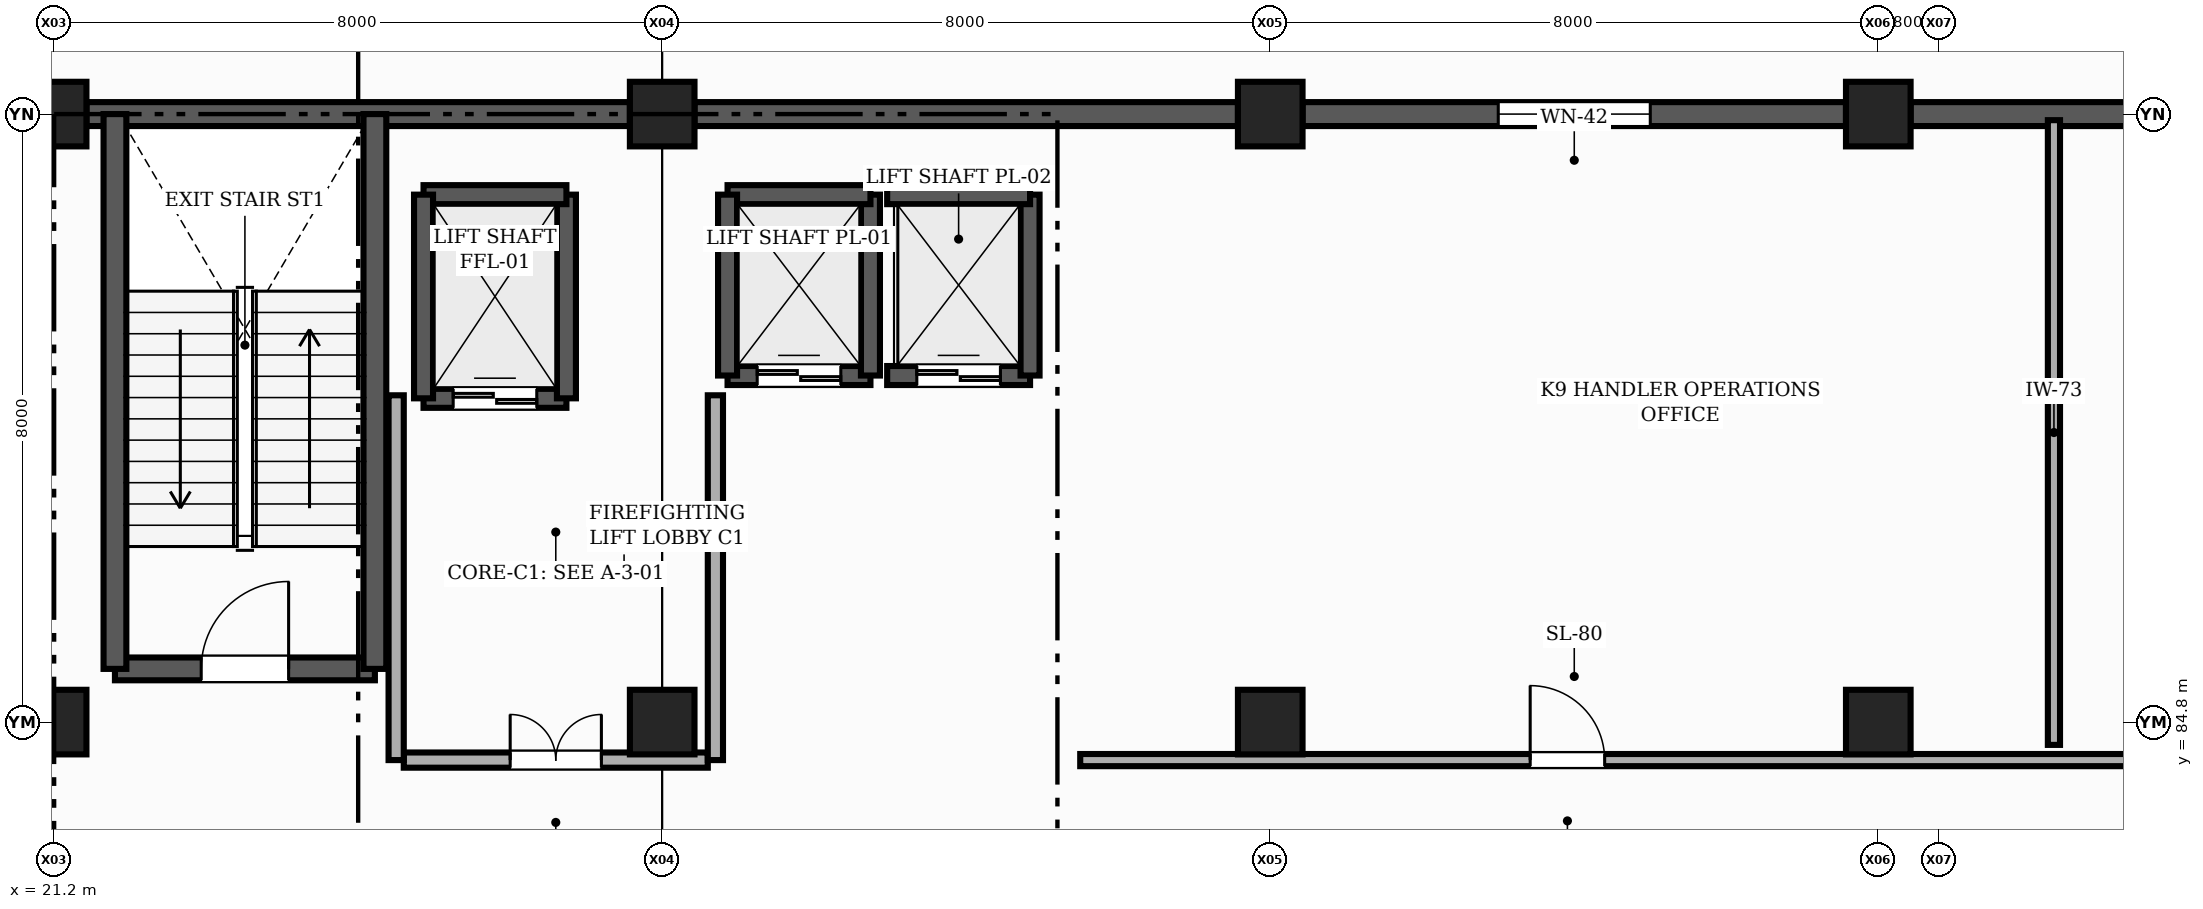
"""IFC4 building model, lengths in metres.
Left out: names, types, materials, properties, quantities, classifications, styles, units other than length and angle.
Written with IfcOpenShell. Run it as: python <this file> out.ifc"""

import sys

from ifc_helpers import new_model, si_unit, direction, frame, frame_2d, origin, origin_2d, place, context, subcontext, project, spatial, rectangle, extrude, element, fill, save


model = new_model("IFC4")
c1 = context("Model", 3, precision=1e-05, world=origin(), true_north=direction((0.0, 1.0)))
c2 = subcontext(c1, "Body", "Model", "MODEL_VIEW")
j1 = project(units=[si_unit("LENGTHUNIT", "METRE"), si_unit("PLANEANGLEUNIT", "RADIAN")], contexts=[c1])
p1 = place(None, origin())
s1 = spatial("IfcSite", under=j1, at=p1, CompositionType="ELEMENT")
p2 = place(p1, origin())
s2 = spatial("IfcBuilding", under=s1, at=p2, CompositionType="ELEMENT")
p3 = place(p2, origin())
s3 = spatial("IfcBuildingStorey", under=s2, at=p3, CompositionType="ELEMENT", Elevation=0.0)
for number, where, z_axis, x_axis in (
    (1, (21.2, 84.8, 0.0), (0.0, 0.0, 1.0), (1.0, 0.0, 0.0)),
    (2, (21.2, 92.8, 0.0), (0.0, 0.0, 1.0), (1.0, 0.0, 0.0)),
    (3, (29.2, 84.8, 0.0), (0.0, 0.0, 1.0), (1.0, 0.0, 0.0)),
    (4, (29.2, 92.8, 0.0), (0.0, 0.0, 1.0), (1.0, 0.0, 0.0)),
    (5, (37.2, 84.8, 0.0), (0.0, 0.0, 1.0), (1.0, 0.0, 0.0)),
    (6, (37.2, 92.8, 0.0), (0.0, 0.0, 1.0), (1.0, 0.0, 0.0)),
    (7, (45.2, 84.8, 0.0), (0.0, 0.0, 1.0), (1.0, 0.0, 0.0)),
    (8, (45.2, 92.8, 0.0), (0.0, 0.0, 1.0), (1.0, 0.0, 0.0)),
):
    element("IfcColumn", number, at=place(p3, frame(where, z_axis=z_axis, x_axis=x_axis)), inside=s3, PredefinedType="COLUMN", context=c2, shape_type="SweptSolid", body=[
        extrude(rectangle(XDim=0.85, YDim=0.85, at=origin_2d()), origin(), (0.0, 0.0, 1.0), 4.8),
    ])
p4 = place(p3, frame((53.575, 92.8, 0.0), z_axis=(0.0, 0.0, 1.0), x_axis=(-1.0, 0.0, 0.0)))
e9 = element("IfcWall", 9, at=p4, inside=s3, PredefinedType="SOLIDWALL", context=c2, shape_type="SweptSolid", body=[
    extrude(rectangle(XDim=7.95, YDim=0.315, at=frame_2d((3.975, 0.0))), origin(), (0.0, 0.0, 1.0), 3.78),
])
p5 = place(p4, frame((3.075, 0.0, 0.9)))
e10 = element("IfcOpeningElement", 10, at=p5, cuts=e9, PredefinedType="OPENING", context=c2, shape_type="SweptSolid", body=[
    extrude(rectangle(XDim=1.8, YDim=1.4, at=frame_2d((0.9, 0.7))), frame((0.0, 0.167, 0.0), z_axis=(0.0, -1.0, 0.0), x_axis=(1.0, 0.0, 0.0)), (0.0, 0.0, 1.0), 0.335),
])
p6 = place(p3, frame((44.775, 92.8, 0.0), z_axis=(0.0, 0.0, 1.0), x_axis=(-1.0, 0.0, 0.0)))
e11 = element("IfcWall", 11, at=p6, inside=s3, PredefinedType="SOLIDWALL", context=c2, shape_type="SweptSolid", body=[
    extrude(rectangle(XDim=7.15, YDim=0.315, at=frame_2d((3.575, 0.0))), origin(), (0.0, 0.0, 1.0), 3.78),
])
p7 = place(p6, frame((2.575, 0.0, 0.9)))
e12 = element("IfcOpeningElement", 12, at=p7, cuts=e11, PredefinedType="OPENING", context=c2, shape_type="SweptSolid", body=[
    extrude(rectangle(XDim=2.0, YDim=1.5, at=frame_2d((1.0, 0.75))), frame((0.0, 0.167, 0.0), z_axis=(0.0, -1.0, 0.0), x_axis=(1.0, 0.0, 0.0)), (0.0, 0.0, 1.0), 0.335),
])
p8 = place(p3, frame((36.775, 92.8, -0.42), z_axis=(0.0, 0.0, 1.0), x_axis=(-1.0, 0.0, 0.0)))
e13 = element("IfcWall", 13, at=p8, inside=s3, PredefinedType="SOLIDWALL", context=c2, shape_type="SweptSolid", body=[
    extrude(rectangle(XDim=7.15, YDim=0.315, at=frame_2d((3.575, 0.0))), origin(), (0.0, 0.0, 1.0), 4.2),
])
p9 = place(p3, frame((28.775, 92.8, -0.42), z_axis=(0.0, 0.0, 1.0), x_axis=(-1.0, 0.0, 0.0)))
e14 = element("IfcWall", 14, at=p9, inside=s3, PredefinedType="SOLIDWALL", context=c2, shape_type="SweptSolid", body=[
    extrude(rectangle(XDim=7.15, YDim=0.315, at=frame_2d((3.575, 0.0))), origin(), (0.0, 0.0, 1.0), 4.95),
])
p10 = place(p3, frame((22.0, 85.5, 0.0), z_axis=(0.0, 0.0, 1.0), x_axis=(1.0, 0.0, 0.0)))
e15 = element("IfcWall", 15, at=p10, inside=s3, PredefinedType="SHEAR", context=c2, shape_type="SweptSolid", body=[
    extrude(rectangle(XDim=3.42, YDim=0.3, at=frame_2d((1.71, 0.0))), origin(), (0.0, 0.0, 1.0), 4.8),
])
p11 = place(p10, frame((1.135, 0.0, 0.0)))
e16 = element("IfcOpeningElement", 16, at=p11, cuts=e15, PredefinedType="OPENING", context=c2, shape_type="SweptSolid", body=[
    extrude(rectangle(XDim=1.15, YDim=2.15, at=frame_2d((0.575, 1.075))), frame((0.0, 0.16, 0.0), z_axis=(0.0, -1.0, 0.0), x_axis=(1.0, 0.0, 0.0)), (0.0, 0.0, 1.0), 0.32),
])
for number, where, z_axis, x_axis in (
    (17, (25.42, 85.5, 0.0), (0.0, 0.0, 1.0), (0.0, 1.0, 0.0)),
    (18, (22.0, 92.8, 0.0), (0.0, 0.0, 1.0), (0.0, -1.0, 0.0)),
):
    element("IfcWall", number, at=place(p3, frame(where, z_axis=z_axis, x_axis=x_axis)), inside=s3, PredefinedType="SHEAR", context=c2, shape_type="SweptSolid", body=[
        extrude(rectangle(XDim=7.3, YDim=0.3, at=frame_2d((3.65, 0.0))), origin(), (0.0, 0.0, 1.0), 4.8),
    ])
p12 = place(p3, frame((26.06, 89.06, 0.0), z_axis=(0.0, 0.0, 1.0), x_axis=(1.0, 0.0, 0.0)))
e19 = element("IfcWall", 19, at=p12, inside=s3, PredefinedType="SHEAR", context=c2, shape_type="SweptSolid", body=[
    extrude(rectangle(XDim=1.88, YDim=0.25, at=frame_2d((0.94, 0.0))), origin(), (0.0, 0.0, 1.0), 4.8),
])
p13 = place(p12, frame((0.39, 0.0, 0.0)))
e20 = element("IfcOpeningElement", 20, at=p13, cuts=e19, PredefinedType="OPENING", context=c2, shape_type="SweptSolid", body=[
    extrude(rectangle(XDim=1.1, YDim=2.2, at=frame_2d((0.55, 1.1))), frame((0.0, 0.135, 0.0), z_axis=(0.0, -1.0, 0.0), x_axis=(1.0, 0.0, 0.0)), (0.0, 0.0, 1.0), 0.27),
])
p14 = place(p3, frame((27.94, 89.06, 0.0), z_axis=(0.0, 0.0, 1.0), x_axis=(0.0, 1.0, 0.0)))
e21 = element("IfcWall", 21, at=p14, inside=s3, PredefinedType="SHEAR", context=c2, shape_type="SweptSolid", body=[
    extrude(rectangle(XDim=2.68, YDim=0.25, at=frame_2d((1.34, 0.0))), origin(), (0.0, 0.0, 1.0), 4.8),
])
p15 = place(p3, frame((27.94, 91.74, 0.0), z_axis=(0.0, 0.0, 1.0), x_axis=(-1.0, 0.0, 0.0)))
e22 = element("IfcWall", 22, at=p15, inside=s3, PredefinedType="SHEAR", context=c2, shape_type="SweptSolid", body=[
    extrude(rectangle(XDim=1.88, YDim=0.25, at=frame_2d((0.94, 0.0))), origin(), (0.0, 0.0, 1.0), 4.8),
])
p16 = place(p3, frame((26.06, 91.74, 0.0), z_axis=(0.0, 0.0, 1.0), x_axis=(0.0, -1.0, 0.0)))
e23 = element("IfcWall", 23, at=p16, inside=s3, PredefinedType="SHEAR", context=c2, shape_type="SweptSolid", body=[
    extrude(rectangle(XDim=2.68, YDim=0.25, at=frame_2d((1.34, 0.0))), origin(), (0.0, 0.0, 1.0), 4.8),
])
p17 = place(p3, frame((30.06, 89.36, 0.0), z_axis=(0.0, 0.0, 1.0), x_axis=(1.0, 0.0, 0.0)))
e24 = element("IfcWall", 24, at=p17, inside=s3, PredefinedType="SHEAR", context=c2, shape_type="SweptSolid", body=[
    extrude(rectangle(XDim=1.88, YDim=0.25, at=frame_2d((0.94, 0.0))), origin(), (0.0, 0.0, 1.0), 4.8),
])
p18 = place(p17, frame((0.39, 0.0, 0.0)))
e25 = element("IfcOpeningElement", 25, at=p18, cuts=e24, PredefinedType="OPENING", context=c2, shape_type="SweptSolid", body=[
    extrude(rectangle(XDim=1.1, YDim=2.2, at=frame_2d((0.55, 1.1))), frame((0.0, 0.135, 0.0), z_axis=(0.0, -1.0, 0.0), x_axis=(1.0, 0.0, 0.0)), (0.0, 0.0, 1.0), 0.27),
])
p19 = place(p3, frame((31.94, 89.36, 0.0), z_axis=(0.0, 0.0, 1.0), x_axis=(0.0, 1.0, 0.0)))
e26 = element("IfcWall", 26, at=p19, inside=s3, PredefinedType="SHEAR", context=c2, shape_type="SweptSolid", body=[
    extrude(rectangle(XDim=2.38, YDim=0.25, at=frame_2d((1.19, 0.0))), origin(), (0.0, 0.0, 1.0), 4.8),
])
p20 = place(p3, frame((31.94, 91.74, 0.0), z_axis=(0.0, 0.0, 1.0), x_axis=(-1.0, 0.0, 0.0)))
e27 = element("IfcWall", 27, at=p20, inside=s3, PredefinedType="SHEAR", context=c2, shape_type="SweptSolid", body=[
    extrude(rectangle(XDim=1.88, YDim=0.25, at=frame_2d((0.94, 0.0))), origin(), (0.0, 0.0, 1.0), 4.8),
])
p21 = place(p3, frame((30.06, 91.74, 0.0), z_axis=(0.0, 0.0, 1.0), x_axis=(0.0, -1.0, 0.0)))
e28 = element("IfcWall", 28, at=p21, inside=s3, PredefinedType="SHEAR", context=c2, shape_type="SweptSolid", body=[
    extrude(rectangle(XDim=2.38, YDim=0.25, at=frame_2d((1.19, 0.0))), origin(), (0.0, 0.0, 1.0), 4.8),
])
p22 = place(p3, frame((32.16, 89.36, 0.0), z_axis=(0.0, 0.0, 1.0), x_axis=(1.0, 0.0, 0.0)))
e29 = element("IfcWall", 29, at=p22, inside=s3, PredefinedType="SHEAR", context=c2, shape_type="SweptSolid", body=[
    extrude(rectangle(XDim=1.88, YDim=0.25, at=frame_2d((0.94, 0.0))), origin(), (0.0, 0.0, 1.0), 4.8),
])
p23 = place(p22, frame((0.39, 0.0, 0.0)))
e30 = element("IfcOpeningElement", 30, at=p23, cuts=e29, PredefinedType="OPENING", context=c2, shape_type="SweptSolid", body=[
    extrude(rectangle(XDim=1.1, YDim=2.2, at=frame_2d((0.55, 1.1))), frame((0.0, 0.135, 0.0), z_axis=(0.0, -1.0, 0.0), x_axis=(1.0, 0.0, 0.0)), (0.0, 0.0, 1.0), 0.27),
])
p24 = place(p3, frame((34.04, 89.36, 0.0), z_axis=(0.0, 0.0, 1.0), x_axis=(0.0, 1.0, 0.0)))
e31 = element("IfcWall", 31, at=p24, inside=s3, PredefinedType="SHEAR", context=c2, shape_type="SweptSolid", body=[
    extrude(rectangle(XDim=2.38, YDim=0.25, at=frame_2d((1.19, 0.0))), origin(), (0.0, 0.0, 1.0), 4.8),
])
p25 = place(p3, frame((34.04, 91.74, 0.0), z_axis=(0.0, 0.0, 1.0), x_axis=(-1.0, 0.0, 0.0)))
e32 = element("IfcWall", 32, at=p25, inside=s3, PredefinedType="SHEAR", context=c2, shape_type="SweptSolid", body=[
    extrude(rectangle(XDim=1.88, YDim=0.25, at=frame_2d((0.94, 0.0))), origin(), (0.0, 0.0, 1.0), 4.8),
])
p26 = place(p3, frame((25.8, 84.3, 0.0), z_axis=(0.0, 0.0, 1.0), x_axis=(1.0, 0.0, 0.0)))
e33 = element("IfcWall", 33, at=p26, inside=s3, PredefinedType="PARTITIONING", context=c2, shape_type="SweptSolid", body=[
    extrude(rectangle(XDim=4.0, YDim=0.2, at=frame_2d((2.0, 0.0))), origin(), (0.0, 0.0, 1.0), 3.765),
])
p27 = place(p26, frame((1.4, 0.0, 0.0)))
e34 = element("IfcOpeningElement", 34, at=p27, cuts=e33, PredefinedType="OPENING", context=c2, shape_type="SweptSolid", body=[
    extrude(rectangle(XDim=1.2, YDim=2.15, at=frame_2d((0.6, 1.075))), frame((0.0, 0.11, 0.0), z_axis=(0.0, -1.0, 0.0), x_axis=(1.0, 0.0, 0.0)), (0.0, 0.0, 1.0), 0.22),
])
p28 = place(p3, frame((25.7, 84.3, 0.0), z_axis=(0.0, 0.0, 1.0), x_axis=(0.0, 1.0, 0.0)))
e35 = element("IfcWall", 35, at=p28, inside=s3, PredefinedType="PARTITIONING", context=c2, shape_type="SweptSolid", body=[
    extrude(rectangle(XDim=4.8, YDim=0.2, at=frame_2d((2.4, 0.0))), origin(), (0.0, 0.0, 1.0), 3.915),
])
p29 = place(p3, frame((29.9, 84.3, 0.0), z_axis=(0.0, 0.0, 1.0), x_axis=(0.0, 1.0, 0.0)))
e36 = element("IfcWall", 36, at=p29, inside=s3, PredefinedType="PARTITIONING", context=c2, shape_type="SweptSolid", body=[
    extrude(rectangle(XDim=4.8, YDim=0.2, at=frame_2d((2.4, 0.0))), origin(), (0.0, 0.0, 1.0), 3.965),
])
p30 = place(p3, frame((47.511, 84.5, 0.0), z_axis=(0.0, 0.0, 1.0), x_axis=(0.0, 1.0, 0.0)))
e37 = element("IfcWall", 37, at=p30, inside=s3, PredefinedType="PARTITIONING", context=c2, shape_type="SweptSolid", body=[
    extrude(rectangle(XDim=8.22, YDim=0.16, at=frame_2d((4.11, 0.0))), origin(), (0.0, 0.0, 1.0), 3.765),
])
p31 = place(p3, frame((34.7, 84.3, 0.0), z_axis=(0.0, 0.0, 1.0), x_axis=(1.0, 0.0, 0.0)))
e38 = element("IfcWall", 38, at=p31, inside=s3, PredefinedType="PARTITIONING", context=c2, shape_type="SweptSolid", body=[
    extrude(rectangle(XDim=35.4, YDim=0.16, at=frame_2d((17.7, 0.0))), origin(), (0.0, 0.0, 1.0), 3.765),
])
p32 = place(p31, frame((5.92, 0.0, 0.0)))
e39 = element("IfcOpeningElement", 39, at=p32, cuts=e38, PredefinedType="OPENING", context=c2, shape_type="SweptSolid", body=[
    extrude(rectangle(XDim=0.98, YDim=2.12, at=frame_2d((0.49, 1.06))), frame((0.0, 0.09, 0.0), z_axis=(0.0, -1.0, 0.0), x_axis=(1.0, 0.0, 0.0)), (0.0, 0.0, 1.0), 0.18),
])
p33 = place(p31, frame((17.2, 0.0, 0.0)))
e40 = element("IfcOpeningElement", 40, at=p33, cuts=e38, PredefinedType="OPENING", context=c2, shape_type="SweptSolid", body=[
    extrude(rectangle(XDim=0.95, YDim=2.15, at=frame_2d((0.475, 1.075))), frame((0.0, 0.09, 0.0), z_axis=(0.0, -1.0, 0.0), x_axis=(1.0, 0.0, 0.0)), (0.0, 0.0, 1.0), 0.18),
])
p34 = place(p31, frame((28.48, 0.0, 0.0)))
e41 = element("IfcOpeningElement", 41, at=p34, cuts=e38, PredefinedType="OPENING", context=c2, shape_type="SweptSolid", body=[
    extrude(rectangle(XDim=1.02, YDim=2.12, at=frame_2d((0.51, 1.06))), frame((0.0, 0.09, 0.0), z_axis=(0.0, -1.0, 0.0), x_axis=(1.0, 0.0, 0.0)), (0.0, 0.0, 1.0), 0.18),
])
p35 = place(p7, origin())
e42 = element("IfcWindow", 42, at=p35, inside=s3, PartitioningType="SINGLE_PANEL", PredefinedType="WINDOW", context=c2, shape_type="SweptSolid", body=[
    extrude(rectangle(XDim=2.0, YDim=1.5, at=frame_2d((1.0, 0.75))), frame((0.0, 0.03, 0.0), z_axis=(0.0, -1.0, 0.0), x_axis=(1.0, 0.0, 0.0)), (0.0, 0.0, 1.0), 0.06),
])
fill(e12, e42)
p36 = place(p11, origin())
e43 = element("IfcDoor", 43, at=p36, inside=s3, OperationType="SINGLE_SWING_RIGHT", PredefinedType="DOOR", context=c2, shape_type="SweptSolid", body=[
    extrude(rectangle(XDim=1.15, YDim=2.15, at=frame_2d((0.575, 1.075))), frame((0.0, 0.025, 0.0), z_axis=(0.0, -1.0, 0.0), x_axis=(1.0, 0.0, 0.0)), (0.0, 0.0, 1.0), 0.05),
])
fill(e16, e43)
p37 = place(p13, origin())
e44 = element("IfcDoor", 44, at=p37, inside=s3, OperationType="DOUBLE_DOOR_SLIDING", PredefinedType="DOOR", context=c2, shape_type="SweptSolid", body=[
    extrude(rectangle(XDim=1.1, YDim=2.2, at=frame_2d((0.55, 1.1))), frame((0.0, 0.025, 0.0), z_axis=(0.0, -1.0, 0.0), x_axis=(1.0, 0.0, 0.0)), (0.0, 0.0, 1.0), 0.05),
])
fill(e20, e44)
p38 = place(p18, origin())
e45 = element("IfcDoor", 45, at=p38, inside=s3, OperationType="DOUBLE_DOOR_SLIDING", PredefinedType="DOOR", context=c2, shape_type="SweptSolid", body=[
    extrude(rectangle(XDim=1.1, YDim=2.2, at=frame_2d((0.55, 1.1))), frame((0.0, 0.025, 0.0), z_axis=(0.0, -1.0, 0.0), x_axis=(1.0, 0.0, 0.0)), (0.0, 0.0, 1.0), 0.05),
])
fill(e25, e45)
p39 = place(p23, origin())
e46 = element("IfcDoor", 46, at=p39, inside=s3, OperationType="DOUBLE_DOOR_SLIDING", PredefinedType="DOOR", context=c2, shape_type="SweptSolid", body=[
    extrude(rectangle(XDim=1.1, YDim=2.2, at=frame_2d((0.55, 1.1))), frame((0.0, 0.025, 0.0), z_axis=(0.0, -1.0, 0.0), x_axis=(1.0, 0.0, 0.0)), (0.0, 0.0, 1.0), 0.05),
])
fill(e30, e46)
p40 = place(p27, origin())
e47 = element("IfcDoor", 47, at=p40, inside=s3, OperationType="DOUBLE_DOOR_SINGLE_SWING", PredefinedType="DOOR", context=c2, shape_type="SweptSolid", body=[
    extrude(rectangle(XDim=1.2, YDim=2.15, at=frame_2d((0.6, 1.075))), frame((0.0, 0.025, 0.0), z_axis=(0.0, -1.0, 0.0), x_axis=(1.0, 0.0, 0.0)), (0.0, 0.0, 1.0), 0.05),
])
fill(e34, e47)
p41 = place(p32, origin())
e48 = element("IfcDoor", 48, at=p41, inside=s3, OperationType="SINGLE_SWING_LEFT", PredefinedType="DOOR", context=c2, shape_type="SweptSolid", body=[
    extrude(rectangle(XDim=0.98, YDim=2.12, at=frame_2d((0.49, 1.06))), frame((0.0, 0.025, 0.0), z_axis=(0.0, -1.0, 0.0), x_axis=(1.0, 0.0, 0.0)), (0.0, 0.0, 1.0), 0.05),
])
fill(e39, e48)
save(model, sys.argv[1])
